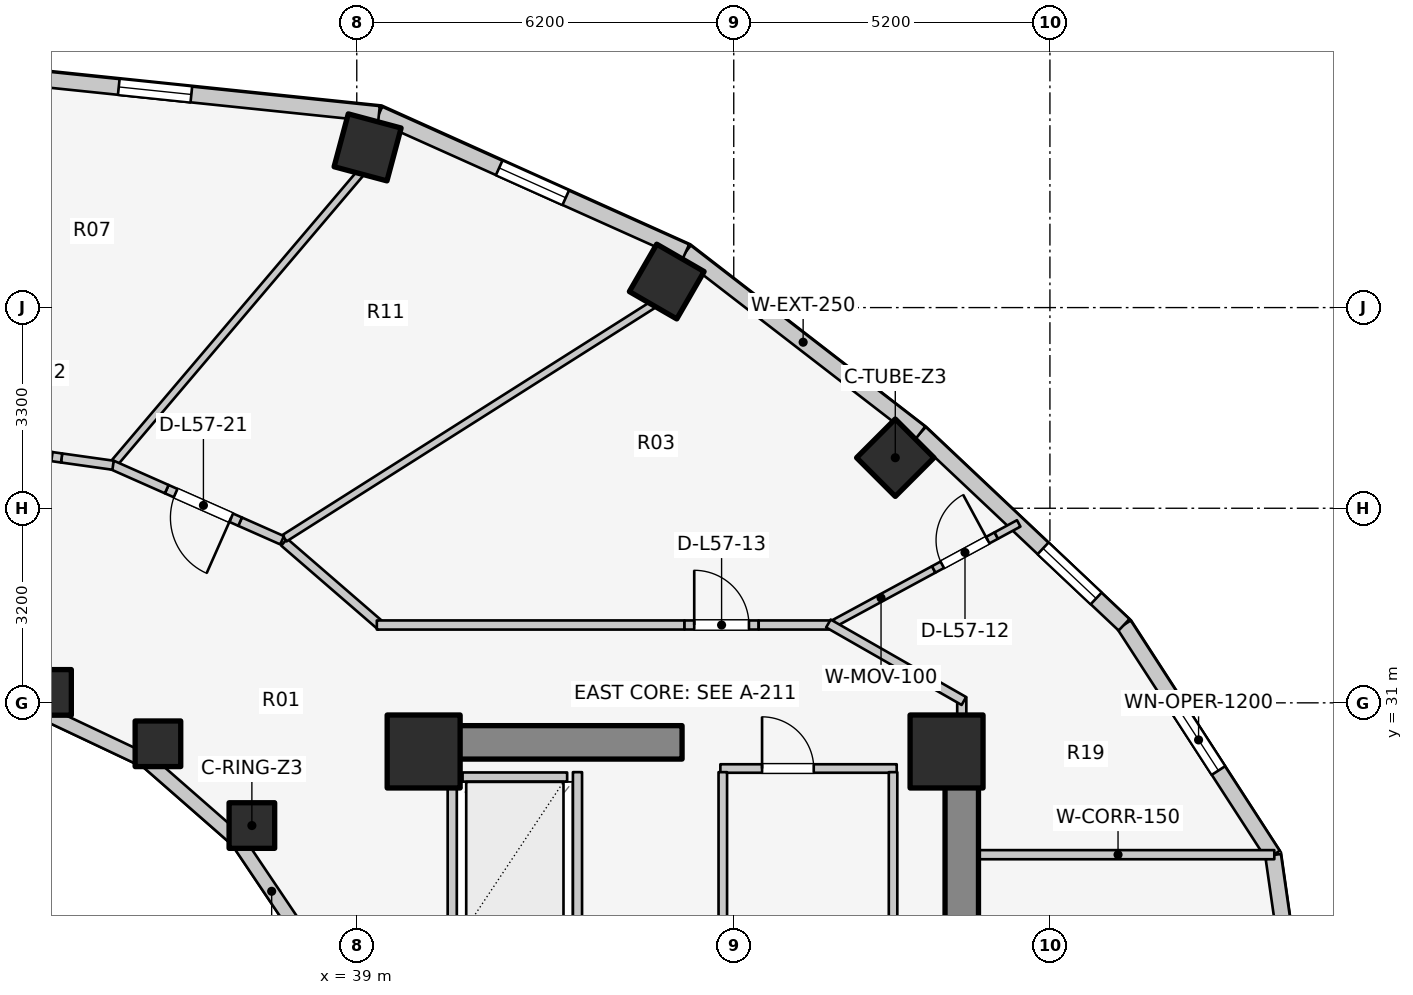
"""IFC4 building model, lengths in metres.
Left out: names, types, materials, properties, quantities, classifications, styles, units other than length and angle.
Written with IfcOpenShell. Run it as: python <this file> out.ifc"""

import sys

from ifc_helpers import new_model, si_unit, direction, frame, frame_2d, origin, origin_2d, place, context, subcontext, project, spatial, rectangle, extrude, element, fill, save


model = new_model("IFC4")
c1 = context("Model", 3, precision=1e-05, world=origin(), true_north=direction((0.0, 1.0)))
c2 = subcontext(c1, "Body", "Model", "MODEL_VIEW")
j1 = project(units=[si_unit("LENGTHUNIT", "METRE"), si_unit("PLANEANGLEUNIT", "RADIAN")], contexts=[c1])
p1 = place(None, origin())
s1 = spatial("IfcSite", under=j1, at=p1, CompositionType="ELEMENT")
p2 = place(p1, origin())
s2 = spatial("IfcBuilding", under=s1, at=p2, CompositionType="ELEMENT")
p3 = place(p2, frame((0.0, 0.0, 187.0)))
s3 = spatial("IfcBuildingStorey", under=s2, at=p3, CompositionType="ELEMENT", Elevation=187.0)
p4 = place(p3, frame((48.95, 17.05, 0.0), z_axis=(0.0, 0.0, 1.0), x_axis=(0.0, 1.0, 0.0)))
e1 = element("IfcWall", 1, at=p4, inside=s3, PredefinedType="SHEAR", context=c2, shape_type="SweptSolid", body=[
    extrude(rectangle(XDim=12.8, YDim=0.55, at=frame_2d((6.4, 0.0))), origin(), (0.0, 0.0, 1.0), 3.1),
])
p5 = place(p3, frame((39.85, 30.35, 0.0), z_axis=(0.0, 0.0, 1.0), x_axis=(1.0, 0.0, 0.0)))
e2 = element("IfcWall", 2, at=p5, inside=s3, PredefinedType="SHEAR", context=c2, shape_type="SweptSolid", body=[
    extrude(rectangle(XDim=4.5, YDim=0.55, at=frame_2d((2.25, 0.0))), origin(), (0.0, 0.0, 1.0), 3.1),
])
for number, where, z_axis, x_axis in (
    (3, (48.7, 30.2, 0.0), (0.0, 0.0, 1.0), (1.0, 0.0, 0.0)),
    (4, (40.1, 30.2, 0.0), (0.0, 0.0, 1.0), (1.0, 0.0, 0.0)),
):
    element("IfcColumn", number, at=place(p3, frame(where, z_axis=z_axis, x_axis=x_axis)), inside=s3, PredefinedType="COLUMN", context=c2, shape_type="SweptSolid", body=[
        extrude(rectangle(XDim=1.2, YDim=1.2, at=origin_2d()), origin(), (0.0, 0.0, 1.0), 3.1),
    ])
p6 = place(p3, frame((37.275, 28.982, 0.0), z_axis=(0.0, 0.0, 1.0), x_axis=(1.0, 0.0, 0.0)))
e5 = element("IfcColumn", 5, at=p6, inside=s3, PredefinedType="COLUMN", context=c2, shape_type="SweptSolid", body=[
    extrude(rectangle(XDim=0.75, YDim=0.75, at=origin_2d()), origin(), (0.0, 0.0, 1.0), 3.1),
])
p7 = place(p3, frame((47.857, 35.031, 0.0), z_axis=(0.0, 0.0, 1.0), x_axis=(0.707106781187, 0.707106781187, 0.0)))
e6 = element("IfcColumn", 6, at=p7, inside=s3, PredefinedType="COLUMN", context=c2, shape_type="SweptSolid", body=[
    extrude(rectangle(XDim=0.9, YDim=0.9, at=origin_2d()), origin(), (0.0, 0.0, 1.0), 3.1),
])
p8 = place(p3, frame((35.73, 30.327, 0.0), z_axis=(0.0, 0.0, 1.0), x_axis=(1.0, 0.0, 0.0)))
e7 = element("IfcColumn", 7, at=p8, inside=s3, PredefinedType="COLUMN", context=c2, shape_type="SweptSolid", body=[
    extrude(rectangle(XDim=0.75, YDim=0.75, at=origin_2d()), origin(), (0.0, 0.0, 1.0), 3.1),
])
p9 = place(p3, frame((44.098, 37.928, 0.0), z_axis=(0.0, 0.0, 1.0), x_axis=(0.5, 0.866025403784, 0.0)))
e8 = element("IfcColumn", 8, at=p9, inside=s3, PredefinedType="COLUMN", context=c2, shape_type="SweptSolid", body=[
    extrude(rectangle(XDim=0.9, YDim=0.9, at=origin_2d()), origin(), (0.0, 0.0, 1.0), 3.1),
])
p10 = place(p3, frame((33.931, 31.172, 0.0), z_axis=(0.0, 0.0, 1.0), x_axis=(1.0, 0.0, 0.0)))
e9 = element("IfcColumn", 9, at=p10, inside=s3, PredefinedType="COLUMN", context=c2, shape_type="SweptSolid", body=[
    extrude(rectangle(XDim=0.75, YDim=0.75, at=origin_2d()), origin(), (0.0, 0.0, 1.0), 3.1),
])
p11 = place(p3, frame((39.178, 40.135, 0.0), z_axis=(0.0, 0.0, 1.0), x_axis=(0.258819045103, 0.965925826289, 0.0)))
e10 = element("IfcColumn", 10, at=p11, inside=s3, PredefinedType="COLUMN", context=c2, shape_type="SweptSolid", body=[
    extrude(rectangle(XDim=0.9, YDim=0.9, at=origin_2d()), origin(), (0.0, 0.0, 1.0), 3.1),
])
p12 = place(p3, frame((38.166, 27.06, 0.0), z_axis=(0.0, 0.0, 1.0), x_axis=(-0.558197800898, 0.829707909492, 0.0)))
e11 = element("IfcWall", 11, at=p12, inside=s3, PredefinedType="STANDARD", context=c2, shape_type="SweptSolid", body=[
    extrude(rectangle(XDim=2.027, YDim=0.23, at=frame_2d((1.013, 0.0))), origin(), (0.0, 0.0, 1.0), 1.22),
])
p13 = place(p3, frame((37.035, 28.742, 0.0), z_axis=(0.0, 0.0, 1.0), x_axis=(-0.752576694707, 0.658504607869, 0.0)))
e12 = element("IfcWall", 12, at=p13, inside=s3, PredefinedType="STANDARD", context=c2, shape_type="SweptSolid", body=[
    extrude(rectangle(XDim=1.959, YDim=0.23, at=frame_2d((0.98, 0.0))), origin(), (0.0, 0.0, 1.0), 1.22),
])
p14 = place(p3, frame((35.56, 30.032, 0.0), z_axis=(0.0, 0.0, 1.0), x_axis=(-0.904179699603, 0.427152280606, 0.0)))
e13 = element("IfcWall", 13, at=p14, inside=s3, PredefinedType="STANDARD", context=c2, shape_type="SweptSolid", body=[
    extrude(rectangle(XDim=1.899, YDim=0.23, at=frame_2d((0.95, 0.0))), origin(), (0.0, 0.0, 1.0), 1.22),
])
p15 = place(p3, frame((54.86, 23.0, 0.0), z_axis=(0.0, 0.0, 1.0), x_axis=(-0.142227632286, 0.989833976288, 0.0)))
e14 = element("IfcWall", 14, at=p15, inside=s3, PredefinedType="STANDARD", context=c2, shape_type="SweptSolid", body=[
    extrude(rectangle(XDim=5.553, YDim=0.26, at=frame_2d((2.776, 0.0))), origin(), (0.0, 0.0, 1.0), 2.57),
])
p16 = place(p15, frame((2.027, 0.0, 0.75)))
e15 = element("IfcOpeningElement", 15, at=p16, cuts=e14, PredefinedType="OPENING", context=c2, shape_type="SweptSolid", body=[
    extrude(rectangle(XDim=1.5, YDim=1.6, at=frame_2d((0.75, 0.8))), frame((0.0, 0.14, 0.0), z_axis=(0.0, -1.0, 0.0), x_axis=(1.0, 0.0, 0.0)), (0.0, 0.0, 1.0), 0.28),
])
p17 = place(p3, frame((54.07, 28.497, 0.0), z_axis=(0.0, 0.0, 1.0), x_axis=(-0.543358984534, 0.839500454989, 0.0)))
e16 = element("IfcWall", 16, at=p17, inside=s3, PredefinedType="STANDARD", context=c2, shape_type="SweptSolid", body=[
    extrude(rectangle(XDim=4.511, YDim=0.26, at=frame_2d((2.256, 0.0))), origin(), (0.0, 0.0, 1.0), 1.22),
])
p18 = place(p17, frame((1.656, 0.0, 0.15)))
e17 = element("IfcOpeningElement", 17, at=p18, cuts=e16, PredefinedType="OPENING", context=c2, shape_type="SweptSolid", body=[
    extrude(rectangle(XDim=1.2, YDim=0.9, at=frame_2d((0.6, 0.45))), frame((0.0, 0.14, 0.0), z_axis=(0.0, -1.0, 0.0), x_axis=(1.0, 0.0, 0.0)), (0.0, 0.0, 1.0), 0.28),
])
p19 = place(p3, frame((51.619, 32.284, 0.0), z_axis=(0.0, 0.0, 1.0), x_axis=(-0.727667301037, 0.68593024354, 0.0)))
e18 = element("IfcWall", 18, at=p19, inside=s3, PredefinedType="STANDARD", context=c2, shape_type="SweptSolid", body=[
    extrude(rectangle(XDim=4.604, YDim=0.26, at=frame_2d((2.302, 0.0))), origin(), (0.0, 0.0, 1.0), 1.22),
])
p20 = place(p19, frame((0.631, 0.0, 0.15)))
e19 = element("IfcOpeningElement", 19, at=p20, cuts=e18, PredefinedType="OPENING", context=c2, shape_type="SweptSolid", body=[
    extrude(rectangle(XDim=1.2, YDim=0.9, at=frame_2d((0.6, 0.45))), frame((0.0, 0.14, 0.0), z_axis=(0.0, -1.0, 0.0), x_axis=(1.0, 0.0, 0.0)), (0.0, 0.0, 1.0), 0.28),
])
p21 = place(p3, frame((48.269, 35.441, 0.0), z_axis=(0.0, 0.0, 1.0), x_axis=(-0.791460185804, 0.611220724687, 0.0)))
e20 = element("IfcWall", 20, at=p21, inside=s3, PredefinedType="STANDARD", context=c2, shape_type="SweptSolid", body=[
    extrude(rectangle(XDim=4.872, YDim=0.26, at=frame_2d((2.436, 0.0))), origin(), (0.0, 0.0, 1.0), 1.22),
])
p22 = place(p3, frame((44.413, 38.419, 0.0), z_axis=(0.0, 0.0, 1.0), x_axis=(-0.912353637112, 0.409403029847, 0.0)))
e21 = element("IfcWall", 21, at=p22, inside=s3, PredefinedType="STANDARD", context=c2, shape_type="SweptSolid", body=[
    extrude(rectangle(XDim=5.533, YDim=0.26, at=frame_2d((2.766, 0.0))), origin(), (0.0, 0.0, 1.0), 1.22),
])
p23 = place(p22, frame((2.167, 0.0, 0.15)))
e22 = element("IfcOpeningElement", 22, at=p23, cuts=e21, PredefinedType="OPENING", context=c2, shape_type="SweptSolid", body=[
    extrude(rectangle(XDim=1.2, YDim=0.9, at=frame_2d((0.6, 0.45))), frame((0.0, 0.14, 0.0), z_axis=(0.0, -1.0, 0.0), x_axis=(1.0, 0.0, 0.0)), (0.0, 0.0, 1.0), 0.28),
])
p24 = place(p3, frame((39.365, 40.685, 0.0), z_axis=(0.0, 0.0, 1.0), x_axis=(-0.994664178965, 0.10316574569, 0.0)))
e23 = element("IfcWall", 23, at=p24, inside=s3, PredefinedType="STANDARD", context=c2, shape_type="SweptSolid", body=[
    extrude(rectangle(XDim=7.405, YDim=0.26, at=frame_2d((3.702, 0.0))), origin(), (0.0, 0.0, 1.0), 1.22),
])
p25 = place(p24, frame((3.102, 0.0, 0.15)))
e24 = element("IfcOpeningElement", 24, at=p25, cuts=e23, PredefinedType="OPENING", context=c2, shape_type="SweptSolid", body=[
    extrude(rectangle(XDim=1.2, YDim=0.9, at=frame_2d((0.6, 0.45))), frame((0.0, 0.14, 0.0), z_axis=(0.0, -1.0, 0.0), x_axis=(1.0, 0.0, 0.0)), (0.0, 0.0, 1.0), 0.28),
])
p26 = place(p3, frame((40.74, 29.78, 0.0), z_axis=(0.0, 0.0, 1.0), x_axis=(1.0, 0.0, 0.0)))
e25 = element("IfcWall", 25, at=p26, inside=s3, PredefinedType="SOLIDWALL", context=c2, shape_type="SweptSolid", body=[
    extrude(rectangle(XDim=1.72, YDim=0.15, at=frame_2d((0.86, 0.0))), origin(), (0.0, 0.0, 1.0), 2.575),
])
for number, where, z_axis, x_axis in (
    (26, (40.57, 27.14, 0.0), (0.0, 0.0, 1.0), (0.0, 1.0, 0.0)),
    (27, (42.63, 27.14, 0.0), (0.0, 0.0, 1.0), (0.0, 1.0, 0.0)),
):
    element("IfcWall", number, at=place(p3, frame(where, z_axis=z_axis, x_axis=x_axis)), inside=s3, PredefinedType="SOLIDWALL", context=c2, shape_type="SweptSolid", body=[
        extrude(rectangle(XDim=2.72, YDim=0.15, at=frame_2d((1.36, 0.0))), origin(), (0.0, 0.0, 1.0), 2.575),
    ])
p27 = place(p3, frame((44.98, 29.92, 0.0), z_axis=(0.0, 0.0, 1.0), x_axis=(1.0, 0.0, 0.0)))
e28 = element("IfcWall", 28, at=p27, inside=s3, PredefinedType="PLUMBINGWALL", context=c2, shape_type="SweptSolid", body=[
    extrude(rectangle(XDim=2.9, YDim=0.14, at=frame_2d((1.45, 0.0))), origin(), (0.0, 0.0, 1.0), 2.575),
])
p28 = place(p27, frame((0.686, 0.0, 0.0)))
e29 = element("IfcOpeningElement", 29, at=p28, cuts=e28, PredefinedType="OPENING", context=c2, shape_type="SweptSolid", body=[
    extrude(rectangle(XDim=0.85, YDim=2.05, at=frame_2d((0.425, 1.025))), frame((0.0, 0.08, 0.0), z_axis=(0.0, -1.0, 0.0), x_axis=(1.0, 0.0, 0.0)), (0.0, 0.0, 1.0), 0.16),
])
for number, where, z_axis, x_axis in (
    (30, (45.02, 25.98, 0.0), (0.0, 0.0, 1.0), (0.0, 1.0, 0.0)),
    (31, (47.82, 25.98, 0.0), (0.0, 0.0, 1.0), (0.0, 1.0, 0.0)),
):
    element("IfcWall", number, at=place(p3, frame(where, z_axis=z_axis, x_axis=x_axis)), inside=s3, PredefinedType="PLUMBINGWALL", context=c2, shape_type="SweptSolid", body=[
        extrude(rectangle(XDim=3.88, YDim=0.14, at=frame_2d((1.94, 0.0))), origin(), (0.0, 0.0, 1.0), 2.575),
    ])
p29 = place(p3, frame((48.95, 28.503, 0.0), z_axis=(0.0, 0.0, 1.0), x_axis=(1.0, 0.0, 0.0)))
e32 = element("IfcWall", 32, at=p29, inside=s3, PredefinedType="PARTITIONING", context=c2, shape_type="SweptSolid", body=[
    extrude(rectangle(XDim=5.14, YDim=0.15, at=frame_2d((2.57, 0.0))), origin(), (0.0, 0.0, 1.0), 2.575),
])
p30 = place(p3, frame((48.95, 29.8, 0.0), z_axis=(0.0, 0.0, 1.0), x_axis=(0.0, 1.0, 0.0)))
e33 = element("IfcWall", 33, at=p30, inside=s3, PredefinedType="PARTITIONING", context=c2, shape_type="SweptSolid", body=[
    extrude(rectangle(XDim=1.29, YDim=0.15, at=frame_2d((0.645, 0.0))), origin(), (0.0, 0.0, 1.0), 1.22),
])
p31 = place(p3, frame((46.756, 32.256, 0.0), z_axis=(0.0, 0.0, 1.0), x_axis=(0.879406539295, 0.476071568828, 0.0)))
e34 = element("IfcWall", 34, at=p31, inside=s3, PredefinedType="MOVABLE", context=c2, shape_type="SweptSolid", body=[
    extrude(rectangle(XDim=1.97, YDim=0.12, at=frame_2d((0.985, 0.0))), origin(), (0.0, 0.0, 1.0), 1.22),
])
p32 = place(p3, frame((48.489, 33.194, 0.0), z_axis=(0.0, 0.0, 1.0), x_axis=(0.879342939039, 0.476189033433, 0.0)))
e35 = element("IfcWall", 35, at=p32, inside=s3, PredefinedType="MOVABLE", context=c2, shape_type="SweptSolid", body=[
    extrude(rectangle(XDim=1.17, YDim=0.12, at=frame_2d((0.585, 0.0))), origin(), (0.0, 0.0, 1.0), 2.11),
])
p33 = place(p32, frame((0.16, 0.0, 0.0)))
e36 = element("IfcOpeningElement", 36, at=p33, cuts=e35, PredefinedType="OPENING", context=c2, shape_type="SweptSolid", body=[
    extrude(rectangle(XDim=0.85, YDim=2.05, at=frame_2d((0.425, 1.025))), frame((0.0, 0.07, 0.0), z_axis=(0.0, -1.0, 0.0), x_axis=(1.0, 0.0, 0.0)), (0.0, 0.0, 1.0), 0.14),
])
p34 = place(p3, frame((49.518, 33.751, 0.0), z_axis=(0.0, 0.0, 1.0), x_axis=(0.879403655312, 0.476076896125, 0.0)))
e37 = element("IfcWall", 37, at=p34, inside=s3, PredefinedType="MOVABLE", context=c2, shape_type="SweptSolid", body=[
    extrude(rectangle(XDim=0.419, YDim=0.12, at=frame_2d((0.21, 0.0))), origin(), (0.0, 0.0, 1.0), 2.575),
])
p35 = place(p3, frame((37.807, 33.642, 0.0), z_axis=(0.0, 0.0, 1.0), x_axis=(0.756055312247, -0.654507727092, 0.0)))
e38 = element("IfcWall", 38, at=p35, inside=s3, PredefinedType="PARTITIONING", context=c2, shape_type="SweptSolid", body=[
    extrude(rectangle(XDim=2.111, YDim=0.15, at=frame_2d((1.055, 0.0))), origin(), (0.0, 0.0, 1.0), 2.019),
])
p36 = place(p3, frame((39.33, 32.28, 0.0), z_axis=(0.0, 0.0, 1.0), x_axis=(1.0, 0.0, 0.0)))
e39 = element("IfcWall", 39, at=p36, inside=s3, PredefinedType="PARTITIONING", context=c2, shape_type="SweptSolid", body=[
    extrude(rectangle(XDim=5.06, YDim=0.15, at=frame_2d((2.53, 0.0))), origin(), (0.0, 0.0, 1.0), 2.019),
])
p37 = place(p3, frame((44.39, 32.28, 0.0), z_axis=(0.0, 0.0, 1.0), x_axis=(1.0, 0.0, 0.0)))
e40 = element("IfcWall", 40, at=p37, inside=s3, PredefinedType="PARTITIONING", context=c2, shape_type="SweptSolid", body=[
    extrude(rectangle(XDim=1.22, YDim=0.15, at=frame_2d((0.61, 0.0))), origin(), (0.0, 0.0, 1.0), 2.575),
])
p38 = place(p37, frame((0.16, 0.0, 0.0)))
e41 = element("IfcOpeningElement", 41, at=p38, cuts=e40, PredefinedType="OPENING", context=c2, shape_type="SweptSolid", body=[
    extrude(rectangle(XDim=0.9, YDim=2.1, at=frame_2d((0.45, 1.05))), frame((0.0, 0.085, 0.0), z_axis=(0.0, -1.0, 0.0), x_axis=(1.0, 0.0, 0.0)), (0.0, 0.0, 1.0), 0.17),
])
p39 = place(p3, frame((45.61, 32.28, 0.0), z_axis=(0.0, 0.0, 1.0), x_axis=(1.0, 0.0, 0.0)))
e42 = element("IfcWall", 42, at=p39, inside=s3, PredefinedType="PARTITIONING", context=c2, shape_type="SweptSolid", body=[
    extrude(rectangle(XDim=1.24, YDim=0.15, at=frame_2d((0.62, 0.0))), origin(), (0.0, 0.0, 1.0), 2.575),
])
p40 = place(p3, frame((46.757, 32.305, 0.0), z_axis=(0.0, 0.0, 1.0), x_axis=(0.867991349648, -0.496579315857, 0.0)))
e43 = element("IfcWall", 43, at=p40, inside=s3, PredefinedType="PARTITIONING", context=c2, shape_type="SweptSolid", body=[
    extrude(rectangle(XDim=2.567, YDim=0.15, at=frame_2d((1.283, 0.0))), origin(), (0.0, 0.0, 1.0), 1.22),
])
p41 = place(p3, frame((37.812, 33.708, 0.0), z_axis=(0.0, 0.0, 1.0), x_axis=(0.844640430122, 0.535334048799, 0.0)))
e44 = element("IfcWall", 44, at=p41, inside=s3, PredefinedType="PARTITIONING", context=c2, shape_type="SweptSolid", body=[
    extrude(rectangle(XDim=7.188, YDim=0.125, at=frame_2d((3.594, 0.0))), origin(), (0.0, 0.0, 1.0), 1.22),
])
p42 = place(p3, frame((35.02, 34.952, 0.0), z_axis=(0.0, 0.0, 1.0), x_axis=(0.647173462792, 0.762342776615, 0.0)))
e45 = element("IfcWall", 45, at=p42, inside=s3, PredefinedType="PARTITIONING", context=c2, shape_type="SweptSolid", body=[
    extrude(rectangle(XDim=6.253, YDim=0.125, at=frame_2d((3.127, 0.0))), origin(), (0.0, 0.0, 1.0), 1.22),
])
p43 = place(p3, frame((37.772, 33.674, 0.0), z_axis=(0.0, 0.0, 1.0), x_axis=(-0.914277556503, 0.405088323302, 0.0)))
e46 = element("IfcWall", 46, at=p43, inside=s3, PredefinedType="PARTITIONING", context=c2, shape_type="SweptSolid", body=[
    extrude(rectangle(XDim=0.755, YDim=0.15, at=frame_2d((0.377, 0.0))), origin(), (0.0, 0.0, 1.0), 2.575),
])
p44 = place(p3, frame((37.082, 33.98, 0.0), z_axis=(0.0, 0.0, 1.0), x_axis=(-0.914382646268, 0.404851054345, 0.0)))
e47 = element("IfcWall", 47, at=p44, inside=s3, PredefinedType="PARTITIONING", context=c2, shape_type="SweptSolid", body=[
    extrude(rectangle(XDim=1.32, YDim=0.15, at=frame_2d((0.66, 0.0))), origin(), (0.0, 0.0, 1.0), 2.16),
])
p45 = place(p44, frame((0.16, 0.0, 0.0)))
e48 = element("IfcOpeningElement", 48, at=p45, cuts=e47, PredefinedType="OPENING", context=c2, shape_type="SweptSolid", body=[
    extrude(rectangle(XDim=1.0, YDim=2.1, at=frame_2d((0.5, 1.05))), frame((0.0, 0.085, 0.0), z_axis=(0.0, -1.0, 0.0), x_axis=(1.0, 0.0, 0.0)), (0.0, 0.0, 1.0), 0.17),
])
p46 = place(p3, frame((35.875, 34.514, 0.0), z_axis=(0.0, 0.0, 1.0), x_axis=(-0.914282340715, 0.405077525242, 0.0)))
e49 = element("IfcWall", 49, at=p46, inside=s3, PredefinedType="PARTITIONING", context=c2, shape_type="SweptSolid", body=[
    extrude(rectangle(XDim=0.982, YDim=0.15, at=frame_2d((0.491, 0.0))), origin(), (0.0, 0.0, 1.0), 2.019),
])
p47 = place(p3, frame((34.992, 34.908, 0.0), z_axis=(0.0, 0.0, 1.0), x_axis=(-0.990238723834, 0.139381741342, 0.0)))
e50 = element("IfcWall", 50, at=p47, inside=s3, PredefinedType="PARTITIONING", context=c2, shape_type="SweptSolid", body=[
    extrude(rectangle(XDim=0.855, YDim=0.15, at=frame_2d((0.427, 0.0))), origin(), (0.0, 0.0, 1.0), 2.575),
])
p48 = place(p3, frame((34.146, 35.027, 0.0), z_axis=(0.0, 0.0, 1.0), x_axis=(-0.990254187593, 0.139271834751, 0.0)))
e51 = element("IfcWall", 51, at=p48, inside=s3, PredefinedType="PARTITIONING", context=c2, shape_type="SweptSolid", body=[
    extrude(rectangle(XDim=1.32, YDim=0.15, at=frame_2d((0.66, 0.0))), origin(), (0.0, 0.0, 1.0), 2.575),
])
p49 = place(p48, frame((0.16, 0.0, 0.0)))
e52 = element("IfcOpeningElement", 52, at=p49, cuts=e51, PredefinedType="OPENING", context=c2, shape_type="SweptSolid", body=[
    extrude(rectangle(XDim=1.0, YDim=2.1, at=frame_2d((0.5, 1.05))), frame((0.0, 0.085, 0.0), z_axis=(0.0, -1.0, 0.0), x_axis=(1.0, 0.0, 0.0)), (0.0, 0.0, 1.0), 0.17),
])
p50 = place(p18, origin())
e53 = element("IfcWindow", 53, at=p50, inside=s3, PartitioningType="SINGLE_PANEL", PredefinedType="WINDOW", context=c2, shape_type="SweptSolid", body=[
    extrude(rectangle(XDim=1.2, YDim=0.9, at=frame_2d((0.6, 0.45))), frame((0.0, 0.03, 0.0), z_axis=(0.0, -1.0, 0.0), x_axis=(1.0, 0.0, 0.0)), (0.0, 0.0, 1.0), 0.06),
])
fill(e17, e53)
p51 = place(p20, origin())
e54 = element("IfcWindow", 54, at=p51, inside=s3, PartitioningType="SINGLE_PANEL", PredefinedType="WINDOW", context=c2, shape_type="SweptSolid", body=[
    extrude(rectangle(XDim=1.2, YDim=0.9, at=frame_2d((0.6, 0.45))), frame((0.0, 0.03, 0.0), z_axis=(0.0, -1.0, 0.0), x_axis=(1.0, 0.0, 0.0)), (0.0, 0.0, 1.0), 0.06),
])
fill(e19, e54)
p52 = place(p23, origin())
e55 = element("IfcWindow", 55, at=p52, inside=s3, PartitioningType="SINGLE_PANEL", PredefinedType="WINDOW", context=c2, shape_type="SweptSolid", body=[
    extrude(rectangle(XDim=1.2, YDim=0.9, at=frame_2d((0.6, 0.45))), frame((0.0, 0.03, 0.0), z_axis=(0.0, -1.0, 0.0), x_axis=(1.0, 0.0, 0.0)), (0.0, 0.0, 1.0), 0.06),
])
fill(e22, e55)
p53 = place(p25, origin())
e56 = element("IfcWindow", 56, at=p53, inside=s3, PartitioningType="SINGLE_PANEL", PredefinedType="WINDOW", context=c2, shape_type="SweptSolid", body=[
    extrude(rectangle(XDim=1.2, YDim=0.9, at=frame_2d((0.6, 0.45))), frame((0.0, 0.03, 0.0), z_axis=(0.0, -1.0, 0.0), x_axis=(1.0, 0.0, 0.0)), (0.0, 0.0, 1.0), 0.06),
])
fill(e24, e56)
p54 = place(p28, origin())
e57 = element("IfcDoor", 57, at=p54, inside=s3, OperationType="SINGLE_SWING_LEFT", PredefinedType="DOOR", context=c2, shape_type="SweptSolid", body=[
    extrude(rectangle(XDim=0.85, YDim=2.05, at=frame_2d((0.425, 1.025))), frame((0.0, 0.025, 0.0), z_axis=(0.0, -1.0, 0.0), x_axis=(1.0, 0.0, 0.0)), (0.0, 0.0, 1.0), 0.05),
])
fill(e29, e57)
p55 = place(p33, origin())
e58 = element("IfcDoor", 58, at=p55, inside=s3, OperationType="SINGLE_SWING_RIGHT", PredefinedType="DOOR", context=c2, shape_type="SweptSolid", body=[
    extrude(rectangle(XDim=0.85, YDim=2.05, at=frame_2d((0.425, 1.025))), frame((0.0, 0.025, 0.0), z_axis=(0.0, -1.0, 0.0), x_axis=(1.0, 0.0, 0.0)), (0.0, 0.0, 1.0), 0.05),
])
fill(e36, e58)
p56 = place(p38, origin())
e59 = element("IfcDoor", 59, at=p56, inside=s3, OperationType="SINGLE_SWING_LEFT", PredefinedType="DOOR", context=c2, shape_type="SweptSolid", body=[
    extrude(rectangle(XDim=0.9, YDim=2.1, at=frame_2d((0.45, 1.05))), frame((0.0, 0.025, 0.0), z_axis=(0.0, -1.0, 0.0), x_axis=(1.0, 0.0, 0.0)), (0.0, 0.0, 1.0), 0.05),
])
fill(e41, e59)
p57 = place(p45, origin())
e60 = element("IfcDoor", 60, at=p57, inside=s3, OperationType="SINGLE_SWING_LEFT", PredefinedType="DOOR", context=c2, shape_type="SweptSolid", body=[
    extrude(rectangle(XDim=1.0, YDim=2.1, at=frame_2d((0.5, 1.05))), frame((0.0, 0.025, 0.0), z_axis=(0.0, -1.0, 0.0), x_axis=(1.0, 0.0, 0.0)), (0.0, 0.0, 1.0), 0.05),
])
fill(e48, e60)
p58 = place(p49, origin())
e61 = element("IfcDoor", 61, at=p58, inside=s3, OperationType="SINGLE_SWING_RIGHT", PredefinedType="DOOR", context=c2, shape_type="SweptSolid", body=[
    extrude(rectangle(XDim=1.0, YDim=2.1, at=frame_2d((0.5, 1.05))), frame((0.0, 0.025, 0.0), z_axis=(0.0, -1.0, 0.0), x_axis=(1.0, 0.0, 0.0)), (0.0, 0.0, 1.0), 0.05),
])
fill(e52, e61)
save(model, sys.argv[1])
